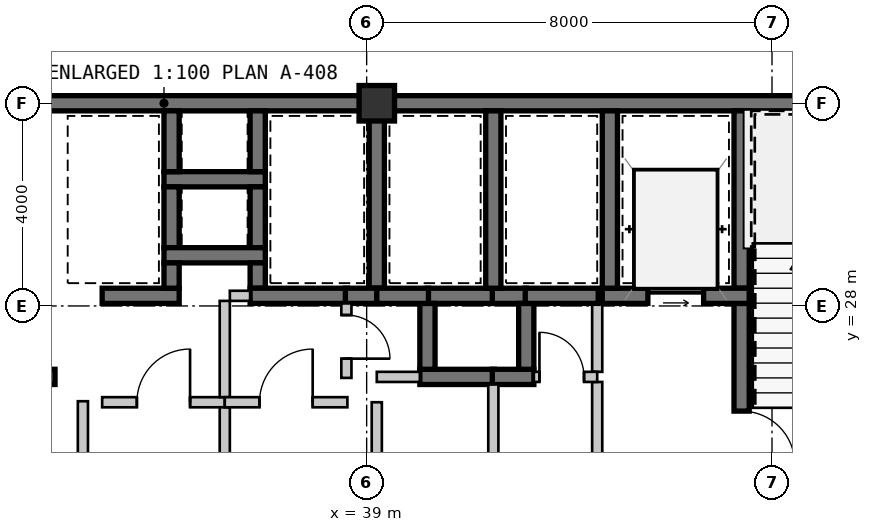
"""IFC4 building model, lengths in metres.
Left out: names, types, materials, properties, quantities, classifications, styles, units other than length and angle.
Written with IfcOpenShell. Run it as: python <this file> out.ifc"""

import sys

from ifc_helpers import new_model, si_unit, direction, frame, frame_2d, origin, origin_2d, place, context, subcontext, project, spatial, rectangle, extrude, source, transform, mapped, element, fill, save


model = new_model("IFC4")
c1 = context("Model", 3, precision=1e-05, world=origin(), true_north=direction((0.0, 1.0)))
c2 = subcontext(c1, "Body", "Model", "MODEL_VIEW")
j1 = project(units=[si_unit("LENGTHUNIT", "METRE"), si_unit("PLANEANGLEUNIT", "RADIAN")], contexts=[c1])
p1 = place(None, origin())
s1 = spatial("IfcSite", under=j1, at=p1, CompositionType="ELEMENT")
p2 = place(p1, origin())
s2 = spatial("IfcBuilding", under=s1, at=p2, CompositionType="ELEMENT")
p3 = place(p2, frame((0.0, 0.0, 65.1)))
s3 = spatial("IfcBuildingStorey", under=s2, at=p3, CompositionType="ELEMENT", Elevation=65.1)
m1 = source(origin(), c2, "Body", "SweptSolid", [
    extrude(rectangle(XDim=0.7, YDim=0.7, at=origin_2d()), origin(), (0.0, 0.0, 1.0), 3.15),
])
p4 = place(p3, frame((39.2, 32.0, 0.0), z_axis=(0.0, 0.0, 1.0), x_axis=(1.0, 0.0, 0.0)))
e1 = element("IfcColumn", 1, at=p4, inside=s3, PredefinedType="COLUMN", context=c2, shape_type="MappedRepresentation", body=[
    mapped(m1, transform((0.0, 0.0, 0.0), scale=1.0)),
])
m2 = source(origin(), c2, "Body", "SweptSolid", [
    extrude(rectangle(XDim=11.2, YDim=0.3, at=frame_2d((5.6, 0.0))), origin(), (0.0, 0.0, 1.0), 2.93),
])
p5 = place(p3, frame((28.0, 32.0, 0.0), z_axis=(0.0, 0.0, 1.0), x_axis=(1.0, 0.0, 0.0)))
e2 = element("IfcWall", 2, at=p5, inside=s3, PredefinedType="SHEAR", context=c2, shape_type="MappedRepresentation", body=[
    mapped(m2, transform((0.0, 0.0, 0.0), scale=1.0)),
])
m3 = source(origin(), c2, "Body", "SweptSolid", [
    extrude(rectangle(XDim=11.95, YDim=0.3, at=frame_2d((5.975, 0.0))), origin(), (0.0, 0.0, 1.0), 2.93),
])
p6 = place(p3, frame((39.2, 32.0, 0.0), z_axis=(0.0, 0.0, 1.0), x_axis=(1.0, 0.0, 0.0)))
e3 = element("IfcWall", 3, at=p6, inside=s3, PredefinedType="SHEAR", context=c2, shape_type="MappedRepresentation", body=[
    mapped(m3, transform((0.0, 0.0, 0.0), scale=1.0)),
])
m4 = source(origin(), c2, "Body", "SweptSolid", [
    extrude(rectangle(XDim=3.5, YDim=0.3, at=frame_2d((1.75, 0.0))), origin(), (0.0, 0.0, 1.0), 2.93),
])
p7 = place(p3, frame((46.4, 31.85, 0.0), z_axis=(0.0, 0.0, 1.0), x_axis=(0.0, -1.0, 0.0)))
e4 = element("IfcWall", 4, at=p7, inside=s3, PredefinedType="SHEAR", context=c2, shape_type="MappedRepresentation", body=[
    mapped(m4, transform((0.0, 0.0, 0.0), scale=1.0)),
])
m5 = source(origin(), c2, "Body", "SweptSolid", [
    extrude(rectangle(XDim=3.9, YDim=0.3, at=frame_2d((1.95, 0.0))), origin(), (0.0, 0.0, 1.0), 2.93),
])
p8 = place(p3, frame((46.4, 28.05, 0.0), z_axis=(0.0, 0.0, 1.0), x_axis=(0.0, -1.0, 0.0)))
e5 = element("IfcWall", 5, at=p8, inside=s3, PredefinedType="SHEAR", context=c2, shape_type="MappedRepresentation", body=[
    mapped(m5, transform((0.0, 0.0, 0.0), scale=1.0)),
])
m6 = source(origin(), c2, "Body", "SweptSolid", [
    extrude(rectangle(XDim=1.05, YDim=2.1, at=frame_2d((0.525, 1.05))), frame((0.0, 0.16, 0.0), z_axis=(0.0, -1.0, 0.0), x_axis=(1.0, 0.0, 0.0)), (0.0, 0.0, 1.0), 0.32),
])
p9 = place(p8, frame((2.125, 0.0, 0.0)))
e6 = element("IfcOpeningElement", 6, at=p9, cuts=e5, PredefinedType="OPENING", context=c2, shape_type="MappedRepresentation", body=[
    mapped(m6, transform((0.0, 0.0, 0.0), scale=1.0)),
])
m7 = source(origin(), c2, "Body", "SweptSolid", [
    extrude(rectangle(XDim=2.9, YDim=0.3, at=frame_2d((1.45, 0.0))), origin(), (0.0, 0.0, 1.0), 2.93),
])
p10 = place(p3, frame((43.65, 28.2, 0.0), z_axis=(0.0, 0.0, 1.0), x_axis=(1.0, 0.0, 0.0)))
e7 = element("IfcWall", 7, at=p10, inside=s3, PredefinedType="SHEAR", context=c2, shape_type="MappedRepresentation", body=[
    mapped(m7, transform((0.0, 0.0, 0.0), scale=1.0)),
])
m8 = source(origin(), c2, "Body", "SweptSolid", [
    extrude(rectangle(XDim=1.1, YDim=2.15, at=frame_2d((0.55, 1.075))), frame((0.0, 0.16, 0.0), z_axis=(0.0, -1.0, 0.0), x_axis=(1.0, 0.0, 0.0)), (0.0, 0.0, 1.0), 0.32),
])
p11 = place(p10, frame((0.9, 0.0, 0.0)))
e8 = element("IfcOpeningElement", 8, at=p11, cuts=e7, PredefinedType="OPENING", context=c2, shape_type="MappedRepresentation", body=[
    mapped(m8, transform((0.0, 0.0, 0.0), scale=1.0)),
])
p12 = place(p3, frame((43.8, 31.85, 0.0), z_axis=(0.0, 0.0, 1.0), x_axis=(0.0, -1.0, 0.0)))
e9 = element("IfcWall", 9, at=p12, inside=s3, PredefinedType="SHEAR", context=c2, shape_type="MappedRepresentation", body=[
    mapped(m4, transform((0.0, 0.0, 0.0), scale=1.0)),
])
m9 = source(origin(), c2, "Body", "SweptSolid", [
    extrude(rectangle(XDim=2.4, YDim=0.2, at=frame_2d((1.2, 0.0))), origin(), (0.0, 0.0, 1.0), 2.93),
])
p13 = place(p3, frame((43.55, 26.5, 0.0), z_axis=(0.0, 0.0, 1.0), x_axis=(0.0, -1.0, 0.0)))
e10 = element("IfcWall", 10, at=p13, inside=s3, PredefinedType="SOLIDWALL", context=c2, shape_type="MappedRepresentation", body=[
    mapped(m9, transform((0.0, 0.0, 0.0), scale=1.0)),
])
m10 = source(origin(), c2, "Body", "SweptSolid", [
    extrude(rectangle(XDim=1.35, YDim=0.2, at=frame_2d((0.675, 0.0))), origin(), (0.0, 0.0, 1.0), 2.93),
])
p14 = place(p3, frame((43.55, 28.05, 0.0), z_axis=(0.0, 0.0, 1.0), x_axis=(0.0, -1.0, 0.0)))
e11 = element("IfcWall", 11, at=p14, inside=s3, PredefinedType="SOLIDWALL", context=c2, shape_type="MappedRepresentation", body=[
    mapped(m10, transform((0.0, 0.0, 0.0), scale=1.0)),
])
m11 = source(origin(), c2, "Body", "SweptSolid", [
    extrude(rectangle(XDim=2.0, YDim=0.3, at=frame_2d((1.0, 0.0))), origin(), (0.0, 0.0, 1.0), 2.93),
])
p15 = place(p3, frame((35.0, 30.5, 0.0), z_axis=(0.0, 0.0, 1.0), x_axis=(1.0, 0.0, 0.0)))
e12 = element("IfcWall", 12, at=p15, inside=s3, PredefinedType="SHEAR", context=c2, shape_type="MappedRepresentation", body=[
    mapped(m11, transform((0.0, 0.0, 0.0), scale=1.0)),
])
m12 = source(origin(), c2, "Body", "SweptSolid", [
    extrude(rectangle(XDim=1.2, YDim=0.3, at=frame_2d((0.6, 0.0))), origin(), (0.0, 0.0, 1.0), 2.93),
])
for number, where, z_axis, x_axis in (
    (13, (35.15, 31.85, 0.0), (0.0, 0.0, 1.0), (0.0, -1.0, 0.0)),
    (14, (36.85, 30.65, 0.0), (0.0, 0.0, 1.0), (0.0, 1.0, 0.0)),
    (15, (35.15, 30.35, 0.0), (0.0, 0.0, 1.0), (0.0, -1.0, 0.0)),
    (16, (36.85, 29.15, 0.0), (0.0, 0.0, 1.0), (0.0, 1.0, 0.0)),
):
    element("IfcWall", number, at=place(p3, frame(where, z_axis=z_axis, x_axis=x_axis)), inside=s3, PredefinedType="SHEAR", context=c2, shape_type="MappedRepresentation", body=[
        mapped(m12, transform((0.0, 0.0, 0.0), scale=1.0)),
    ])
p16 = place(p3, frame((35.0, 29.0, 0.0), z_axis=(0.0, 0.0, 1.0), x_axis=(1.0, 0.0, 0.0)))
e17 = element("IfcWall", 17, at=p16, inside=s3, PredefinedType="SHEAR", context=c2, shape_type="MappedRepresentation", body=[
    mapped(m11, transform((0.0, 0.0, 0.0), scale=1.0)),
])
m13 = source(origin(), c2, "Body", "SweptSolid", [
    extrude(rectangle(XDim=2.2, YDim=0.3, at=frame_2d((1.1, 0.0))), origin(), (0.0, 0.0, 1.0), 2.93),
])
p17 = place(p3, frame((30.65, 26.6, 0.0), z_axis=(0.0, 0.0, 1.0), x_axis=(1.0, 0.0, 0.0)))
e18 = element("IfcWall", 18, at=p17, inside=s3, PredefinedType="SHEAR", context=c2, shape_type="MappedRepresentation", body=[
    mapped(m13, transform((0.0, 0.0, 0.0), scale=1.0)),
])
m14 = source(origin(), c2, "Body", "SweptSolid", [
    extrude(rectangle(XDim=1.32, YDim=0.3, at=frame_2d((0.66, 0.0))), origin(), (0.0, 0.0, 1.0), 2.93),
])
p18 = place(p3, frame((41.52, 28.2, 0.0), z_axis=(0.0, 0.0, 1.0), x_axis=(-1.0, 0.0, 0.0)))
e19 = element("IfcWall", 19, at=p18, inside=s3, PredefinedType="SHEAR", context=c2, shape_type="MappedRepresentation", body=[
    mapped(m14, transform((0.0, 0.0, 0.0), scale=1.0)),
])
m15 = source(origin(), c2, "Body", "SweptSolid", [
    extrude(rectangle(XDim=0.67, YDim=0.3, at=frame_2d((0.335, 0.0))), origin(), (0.0, 0.0, 1.0), 2.93),
])
p19 = place(p3, frame((42.15, 28.2, 0.0), z_axis=(0.0, 0.0, 1.0), x_axis=(-1.0, 0.0, 0.0)))
e20 = element("IfcWall", 20, at=p19, inside=s3, PredefinedType="SHEAR", context=c2, shape_type="MappedRepresentation", body=[
    mapped(m15, transform((0.0, 0.0, 0.0), scale=1.0)),
])
m16 = source(origin(), c2, "Body", "SweptSolid", [
    extrude(rectangle(XDim=1.47, YDim=0.3, at=frame_2d((0.735, 0.0))), origin(), (0.0, 0.0, 1.0), 2.93),
])
p20 = place(p3, frame((40.05, 26.6, 0.0), z_axis=(0.0, 0.0, 1.0), x_axis=(1.0, 0.0, 0.0)))
e21 = element("IfcWall", 21, at=p20, inside=s3, PredefinedType="SHEAR", context=c2, shape_type="MappedRepresentation", body=[
    mapped(m16, transform((0.0, 0.0, 0.0), scale=1.0)),
])
m17 = source(origin(), c2, "Body", "SweptSolid", [
    extrude(rectangle(XDim=1.3, YDim=0.3, at=frame_2d((0.65, 0.0))), origin(), (0.0, 0.0, 1.0), 2.93),
])
p21 = place(p3, frame((40.2, 28.05, 0.0), z_axis=(0.0, 0.0, 1.0), x_axis=(0.0, -1.0, 0.0)))
e22 = element("IfcWall", 22, at=p21, inside=s3, PredefinedType="SHEAR", context=c2, shape_type="MappedRepresentation", body=[
    mapped(m17, transform((0.0, 0.0, 0.0), scale=1.0)),
])
m18 = source(origin(), c2, "Body", "SweptSolid", [
    extrude(rectangle(XDim=0.82, YDim=0.3, at=frame_2d((0.41, 0.0))), origin(), (0.0, 0.0, 1.0), 2.93),
])
p22 = place(p3, frame((41.48, 26.6, 0.0), z_axis=(0.0, 0.0, 1.0), x_axis=(1.0, 0.0, 0.0)))
e23 = element("IfcWall", 23, at=p22, inside=s3, PredefinedType="SHEAR", context=c2, shape_type="MappedRepresentation", body=[
    mapped(m18, transform((0.0, 0.0, 0.0), scale=1.0)),
])
p23 = place(p3, frame((42.15, 26.75, 0.0), z_axis=(0.0, 0.0, 1.0), x_axis=(0.0, 1.0, 0.0)))
e24 = element("IfcWall", 24, at=p23, inside=s3, PredefinedType="SHEAR", context=c2, shape_type="MappedRepresentation", body=[
    mapped(m17, transform((0.0, 0.0, 0.0), scale=1.0)),
])
m19 = source(origin(), c2, "Body", "SweptSolid", [
    extrude(rectangle(XDim=1.52, YDim=0.3, at=frame_2d((0.76, 0.0))), origin(), (0.0, 0.0, 1.0), 2.93),
])
p24 = place(p3, frame((33.78, 28.2, 0.0), z_axis=(0.0, 0.0, 1.0), x_axis=(1.0, 0.0, 0.0)))
e25 = element("IfcWall", 25, at=p24, inside=s3, PredefinedType="SHEAR", context=c2, shape_type="MappedRepresentation", body=[
    mapped(m19, transform((0.0, 0.0, 0.0), scale=1.0)),
])
m20 = source(origin(), c2, "Body", "SweptSolid", [
    extrude(rectangle(XDim=0.5, YDim=0.3, at=frame_2d((0.25, 0.0))), origin(), (0.0, 0.0, 1.0), 2.93),
])
p25 = place(p3, frame((35.15, 28.35, 0.0), z_axis=(0.0, 0.0, 1.0), x_axis=(0.0, 1.0, 0.0)))
e26 = element("IfcWall", 26, at=p25, inside=s3, PredefinedType="SHEAR", context=c2, shape_type="MappedRepresentation", body=[
    mapped(m20, transform((0.0, 0.0, 0.0), scale=1.0)),
])
p26 = place(p3, frame((39.2, 28.35, 0.0), z_axis=(0.0, 0.0, 1.0), x_axis=(0.0, 1.0, 0.0)))
e27 = element("IfcWall", 27, at=p26, inside=s3, PredefinedType="SHEAR", context=c2, shape_type="MappedRepresentation", body=[
    mapped(m4, transform((0.0, 0.0, 0.0), scale=1.0)),
])
p27 = place(p3, frame((36.85, 28.85, 0.0), z_axis=(0.0, 0.0, 1.0), x_axis=(0.0, -1.0, 0.0)))
e28 = element("IfcWall", 28, at=p27, inside=s3, PredefinedType="SHEAR", context=c2, shape_type="MappedRepresentation", body=[
    mapped(m20, transform((0.0, 0.0, 0.0), scale=1.0)),
])
m21 = source(origin(), c2, "Body", "SweptSolid", [
    extrude(rectangle(XDim=1.92, YDim=0.3, at=frame_2d((0.96, 0.0))), origin(), (0.0, 0.0, 1.0), 2.93),
])
p28 = place(p3, frame((36.7, 28.2, 0.0), z_axis=(0.0, 0.0, 1.0), x_axis=(1.0, 0.0, 0.0)))
e29 = element("IfcWall", 29, at=p28, inside=s3, PredefinedType="SHEAR", context=c2, shape_type="MappedRepresentation", body=[
    mapped(m21, transform((0.0, 0.0, 0.0), scale=1.0)),
])
m22 = source(origin(), c2, "Body", "SweptSolid", [
    extrude(rectangle(XDim=0.62, YDim=0.3, at=frame_2d((0.31, 0.0))), origin(), (0.0, 0.0, 1.0), 2.93),
])
p29 = place(p3, frame((38.58, 28.2, 0.0), z_axis=(0.0, 0.0, 1.0), x_axis=(1.0, 0.0, 0.0)))
e30 = element("IfcWall", 30, at=p29, inside=s3, PredefinedType="SHEAR", context=c2, shape_type="MappedRepresentation", body=[
    mapped(m22, transform((0.0, 0.0, 0.0), scale=1.0)),
])
p30 = place(p3, frame((41.5, 28.35, 0.0), z_axis=(0.0, 0.0, 1.0), x_axis=(0.0, 1.0, 0.0)))
e31 = element("IfcWall", 31, at=p30, inside=s3, PredefinedType="SHEAR", context=c2, shape_type="MappedRepresentation", body=[
    mapped(m4, transform((0.0, 0.0, 0.0), scale=1.0)),
])
m23 = source(origin(), c2, "Body", "SweptSolid", [
    extrude(rectangle(XDim=1.02, YDim=0.3, at=frame_2d((0.51, 0.0))), origin(), (0.0, 0.0, 1.0), 2.93),
])
p31 = place(p3, frame((39.2, 28.2, 0.0), z_axis=(0.0, 0.0, 1.0), x_axis=(1.0, 0.0, 0.0)))
e32 = element("IfcWall", 32, at=p31, inside=s3, PredefinedType="SHEAR", context=c2, shape_type="MappedRepresentation", body=[
    mapped(m23, transform((0.0, 0.0, 0.0), scale=1.0)),
])
m24 = source(origin(), c2, "Body", "SweptSolid", [
    extrude(rectangle(XDim=1.44, YDim=0.3, at=frame_2d((0.72, 0.0))), origin(), (0.0, 0.0, 1.0), 2.93),
])
p32 = place(p3, frame((42.13, 28.2, 0.0), z_axis=(0.0, 0.0, 1.0), x_axis=(1.0, 0.0, 0.0)))
e33 = element("IfcWall", 33, at=p32, inside=s3, PredefinedType="SHEAR", context=c2, shape_type="MappedRepresentation", body=[
    mapped(m24, transform((0.0, 0.0, 0.0), scale=1.0)),
])
m25 = source(origin(), c2, "Body", "SweptSolid", [
    extrude(rectangle(XDim=2.02, YDim=0.2, at=frame_2d((1.01, 0.0))), origin(), (0.0, 0.0, 1.0), 2.93),
])
p33 = place(p3, frame((33.4, 26.12, 0.0), z_axis=(0.0, 0.0, 1.0), x_axis=(0.0, -1.0, 0.0)))
e34 = element("IfcWall", 34, at=p33, inside=s3, PredefinedType="SOLIDWALL", context=c2, shape_type="MappedRepresentation", body=[
    mapped(m25, transform((0.0, 0.0, 0.0), scale=1.0)),
])
m26 = source(origin(), c2, "Body", "SweptSolid", [
    extrude(rectangle(XDim=2.42, YDim=0.2, at=frame_2d((1.21, 0.0))), origin(), (0.0, 0.0, 1.0), 2.93),
])
p34 = place(p3, frame((33.78, 26.1, 0.0), z_axis=(0.0, 0.0, 1.0), x_axis=(1.0, 0.0, 0.0)))
e35 = element("IfcWall", 35, at=p34, inside=s3, PredefinedType="SOLIDWALL", context=c2, shape_type="MappedRepresentation", body=[
    mapped(m26, transform((0.0, 0.0, 0.0), scale=1.0)),
])
m27 = source(origin(), c2, "Body", "SweptSolid", [
    extrude(rectangle(XDim=1.05, YDim=2.1, at=frame_2d((0.525, 1.05))), frame((0.0, 0.11, 0.0), z_axis=(0.0, -1.0, 0.0), x_axis=(1.0, 0.0, 0.0)), (0.0, 0.0, 1.0), 0.22),
])
p35 = place(p34, frame((0.685, 0.0, 0.0)))
e36 = element("IfcOpeningElement", 36, at=p35, cuts=e35, PredefinedType="OPENING", context=c2, shape_type="MappedRepresentation", body=[
    mapped(m27, transform((0.0, 0.0, 0.0), scale=1.0)),
])
m28 = source(origin(), c2, "Body", "SweptSolid", [
    extrude(rectangle(XDim=1.9, YDim=0.2, at=frame_2d((0.95, 0.0))), origin(), (0.0, 0.0, 1.0), 2.93),
])
p36 = place(p3, frame((36.2, 26.0, 0.0), z_axis=(0.0, 0.0, 1.0), x_axis=(0.0, -1.0, 0.0)))
e37 = element("IfcWall", 37, at=p36, inside=s3, PredefinedType="SOLIDWALL", context=c2, shape_type="MappedRepresentation", body=[
    mapped(m28, transform((0.0, 0.0, 0.0), scale=1.0)),
])
m29 = source(origin(), c2, "Body", "SweptSolid", [
    extrude(rectangle(XDim=1.9, YDim=0.2, at=frame_2d((0.95, 0.0))), origin(), (0.0, 0.0, 1.0), 2.93),
])
p37 = place(p3, frame((36.2, 28.1, 0.0), z_axis=(0.0, 0.0, 1.0), x_axis=(0.0, -1.0, 0.0)))
e38 = element("IfcWall", 38, at=p37, inside=s3, PredefinedType="SOLIDWALL", context=c2, shape_type="MappedRepresentation", body=[
    mapped(m29, transform((0.0, 0.0, 0.0), scale=1.0)),
])
m30 = source(origin(), c2, "Body", "SweptSolid", [
    extrude(rectangle(XDim=0.4, YDim=0.2, at=frame_2d((0.2, 0.0))), origin(), (0.0, 0.0, 1.0), 2.93),
])
p38 = place(p3, frame((36.7, 28.2, 0.0), z_axis=(0.0, 0.0, 1.0), x_axis=(-1.0, 0.0, 0.0)))
e39 = element("IfcWall", 39, at=p38, inside=s3, PredefinedType="SOLIDWALL", context=c2, shape_type="MappedRepresentation", body=[
    mapped(m30, transform((0.0, 0.0, 0.0), scale=1.0)),
])
m31 = source(origin(), c2, "Body", "SweptSolid", [
    extrude(rectangle(XDim=2.42, YDim=0.2, at=frame_2d((1.21, 0.0))), origin(), (0.0, 0.0, 1.0), 2.93),
])
p39 = place(p3, frame((36.2, 26.1, 0.0), z_axis=(0.0, 0.0, 1.0), x_axis=(1.0, 0.0, 0.0)))
e40 = element("IfcWall", 40, at=p39, inside=s3, PredefinedType="SOLIDWALL", context=c2, shape_type="MappedRepresentation", body=[
    mapped(m31, transform((0.0, 0.0, 0.0), scale=1.0)),
])
p40 = place(p39, frame((0.685, 0.0, 0.0)))
e41 = element("IfcOpeningElement", 41, at=p40, cuts=e40, PredefinedType="OPENING", context=c2, shape_type="MappedRepresentation", body=[
    mapped(m27, transform((0.0, 0.0, 0.0), scale=1.0)),
])
m32 = source(origin(), c2, "Body", "SweptSolid", [
    extrude(rectangle(XDim=2.0, YDim=0.2, at=frame_2d((1.0, 0.0))), origin(), (0.0, 0.0, 1.0), 2.47),
])
p41 = place(p3, frame((39.2, 26.1, 0.0), z_axis=(0.0, 0.0, 1.0), x_axis=(0.0, -1.0, 0.0)))
e42 = element("IfcWall", 42, at=p41, inside=s3, PredefinedType="SOLIDWALL", context=c2, shape_type="MappedRepresentation", body=[
    mapped(m32, transform((0.0, 0.0, 0.0), scale=1.0)),
])
m33 = source(origin(), c2, "Body", "SweptSolid", [
    extrude(rectangle(XDim=1.47, YDim=0.2, at=frame_2d((0.735, 0.0))), origin(), (0.0, 0.0, 1.0), 2.93),
])
p42 = place(p3, frame((38.6, 28.05, 0.0), z_axis=(0.0, 0.0, 1.0), x_axis=(0.0, -1.0, 0.0)))
e43 = element("IfcWall", 43, at=p42, inside=s3, PredefinedType="SOLIDWALL", context=c2, shape_type="MappedRepresentation", body=[
    mapped(m33, transform((0.0, 0.0, 0.0), scale=1.0)),
])
m34 = source(origin(), c2, "Body", "SweptSolid", [
    extrude(rectangle(XDim=0.86, YDim=2.1, at=frame_2d((0.43, 1.05))), frame((0.0, 0.11, 0.0), z_axis=(0.0, -1.0, 0.0), x_axis=(1.0, 0.0, 0.0)), (0.0, 0.0, 1.0), 0.22),
])
p43 = place(p42, frame((0.23, 0.0, 0.0)))
e44 = element("IfcOpeningElement", 44, at=p43, cuts=e43, PredefinedType="OPENING", context=c2, shape_type="MappedRepresentation", body=[
    mapped(m34, transform((0.0, 0.0, 0.0), scale=1.0)),
])
m35 = source(origin(), c2, "Body", "SweptSolid", [
    extrude(rectangle(XDim=0.85, YDim=0.2, at=frame_2d((0.425, 0.0))), origin(), (0.0, 0.0, 1.0), 2.93),
])
p44 = place(p3, frame((39.2, 26.6, 0.0), z_axis=(0.0, 0.0, 1.0), x_axis=(1.0, 0.0, 0.0)))
e45 = element("IfcWall", 45, at=p44, inside=s3, PredefinedType="SOLIDWALL", context=c2, shape_type="MappedRepresentation", body=[
    mapped(m35, transform((0.0, 0.0, 0.0), scale=1.0)),
])
m36 = source(origin(), c2, "Body", "SweptSolid", [
    extrude(rectangle(XDim=2.35, YDim=0.2, at=frame_2d((1.175, 0.0))), origin(), (0.0, 0.0, 1.0), 2.93),
])
p45 = place(p3, frame((41.5, 26.45, 0.0), z_axis=(0.0, 0.0, 1.0), x_axis=(0.0, -1.0, 0.0)))
e46 = element("IfcWall", 46, at=p45, inside=s3, PredefinedType="SOLIDWALL", context=c2, shape_type="MappedRepresentation", body=[
    mapped(m36, transform((0.0, 0.0, 0.0), scale=1.0)),
])
m37 = source(origin(), c2, "Body", "SweptSolid", [
    extrude(rectangle(XDim=1.25, YDim=0.2, at=frame_2d((0.625, 0.0))), origin(), (0.0, 0.0, 1.0), 2.93),
])
p46 = place(p3, frame((42.3, 26.6, 0.0), z_axis=(0.0, 0.0, 1.0), x_axis=(1.0, 0.0, 0.0)))
e47 = element("IfcWall", 47, at=p46, inside=s3, PredefinedType="SOLIDWALL", context=c2, shape_type="MappedRepresentation", body=[
    mapped(m37, transform((0.0, 0.0, 0.0), scale=1.0)),
])
m38 = source(origin(), c2, "Body", "SweptSolid", [
    extrude(rectangle(XDim=0.88, YDim=2.1, at=frame_2d((0.44, 1.05))), frame((0.0, 0.11, 0.0), z_axis=(0.0, -1.0, 0.0), x_axis=(1.0, 0.0, 0.0)), (0.0, 0.0, 1.0), 0.22),
])
p47 = place(p46, frame((0.11, 0.0, 0.0)))
e48 = element("IfcOpeningElement", 48, at=p47, cuts=e47, PredefinedType="OPENING", context=c2, shape_type="MappedRepresentation", body=[
    mapped(m38, transform((0.0, 0.0, 0.0), scale=1.0)),
])
m39 = source(origin(), c2, "Body", "SweptSolid", [
    extrude(rectangle(XDim=1.05, YDim=2.1, at=frame_2d((0.525, 1.05))), frame((0.0, 0.025, 0.0), z_axis=(0.0, -1.0, 0.0), x_axis=(1.0, 0.0, 0.0)), (0.0, 0.0, 1.0), 0.05),
])
p48 = place(p9, origin())
e49 = element("IfcDoor", 49, at=p48, inside=s3, OperationType="SINGLE_SWING_RIGHT", PredefinedType="DOOR", context=c2, shape_type="MappedRepresentation", body=[
    mapped(m39, transform((0.0, 0.0, 0.0), scale=1.0)),
])
fill(e6, e49)
m40 = source(origin(), c2, "Body", "SweptSolid", [
    extrude(rectangle(XDim=1.1, YDim=2.15, at=frame_2d((0.55, 1.075))), frame((0.0, 0.025, 0.0), z_axis=(0.0, -1.0, 0.0), x_axis=(1.0, 0.0, 0.0)), (0.0, 0.0, 1.0), 0.05),
])
p49 = place(p11, origin())
e50 = element("IfcDoor", 50, at=p49, inside=s3, OperationType="SLIDING_TO_LEFT", PredefinedType="DOOR", context=c2, shape_type="MappedRepresentation", body=[
    mapped(m40, transform((0.0, 0.0, 0.0), scale=1.0)),
])
fill(e8, e50)
p50 = place(p35, origin())
e51 = element("IfcDoor", 51, at=p50, inside=s3, OperationType="SINGLE_SWING_RIGHT", PredefinedType="DOOR", context=c2, shape_type="MappedRepresentation", body=[
    mapped(m39, transform((0.0, 0.0, 0.0), scale=1.0)),
])
fill(e36, e51)
p51 = place(p40, origin())
e52 = element("IfcDoor", 52, at=p51, inside=s3, OperationType="SINGLE_SWING_RIGHT", PredefinedType="DOOR", context=c2, shape_type="MappedRepresentation", body=[
    mapped(m39, transform((0.0, 0.0, 0.0), scale=1.0)),
])
fill(e41, e52)
m41 = source(origin(), c2, "Body", "SweptSolid", [
    extrude(rectangle(XDim=0.88, YDim=2.1, at=frame_2d((0.44, 1.05))), frame((0.0, 0.025, 0.0), z_axis=(0.0, -1.0, 0.0), x_axis=(1.0, 0.0, 0.0)), (0.0, 0.0, 1.0), 0.05),
])
p52 = place(p47, origin())
e53 = element("IfcDoor", 53, at=p52, inside=s3, OperationType="SINGLE_SWING_LEFT", PredefinedType="DOOR", context=c2, shape_type="MappedRepresentation", body=[
    mapped(m41, transform((0.0, 0.0, 0.0), scale=1.0)),
])
fill(e48, e53)
m42 = source(origin(), c2, "Body", "SweptSolid", [
    extrude(rectangle(XDim=0.86, YDim=2.1, at=frame_2d((0.43, 1.05))), frame((0.0, 0.025, 0.0), z_axis=(0.0, -1.0, 0.0), x_axis=(1.0, 0.0, 0.0)), (0.0, 0.0, 1.0), 0.05),
])
p53 = place(p43, origin())
e54 = element("IfcDoor", 54, at=p53, inside=s3, OperationType="SINGLE_SWING_RIGHT", PredefinedType="DOOR", context=c2, shape_type="MappedRepresentation", body=[
    mapped(m42, transform((0.0, 0.0, 0.0), scale=1.0)),
])
fill(e44, e54)
save(model, sys.argv[1])
